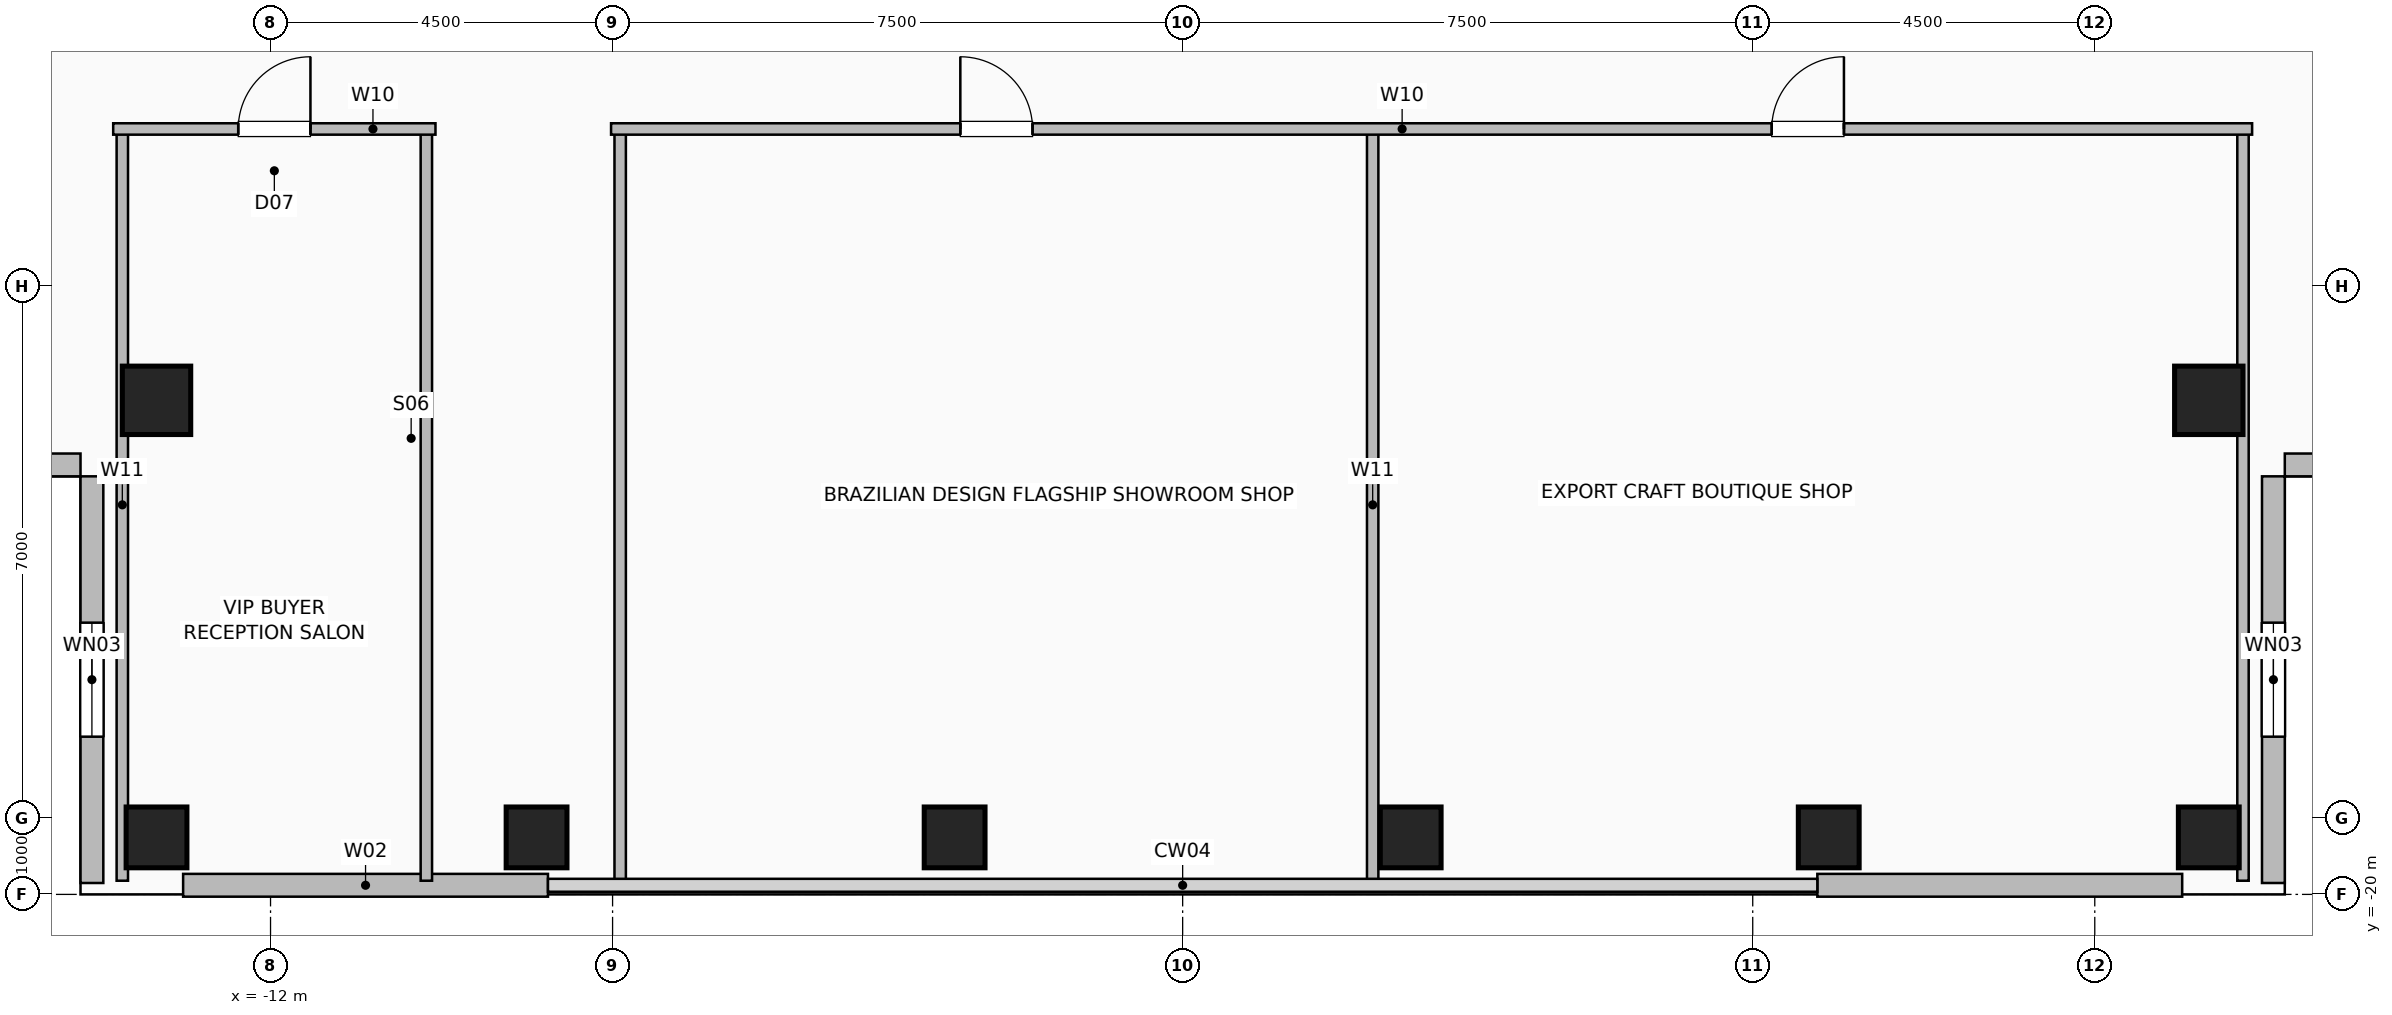
"""IFC4 building model, lengths in metres.
Left out: names, types, materials, properties, quantities, classifications, styles, units other than length and angle.
Written with IfcOpenShell. Run it as: python <this file> out.ifc"""

import sys

from ifc_helpers import new_model, si_unit, direction, frame, frame_2d, origin, origin_2d, place, context, subcontext, project, spatial, rectangle, hollow_rectangle, extrude, element, fill, save


model = new_model("IFC4")
c1 = context("Model", 3, precision=1e-05, world=origin(), true_north=direction((0.0, 1.0)))
c2 = subcontext(c1, "Body", "Model", "MODEL_VIEW")
j1 = project(units=[si_unit("LENGTHUNIT", "METRE"), si_unit("PLANEANGLEUNIT", "RADIAN")], contexts=[c1])
p1 = place(None, origin())
s1 = spatial("IfcSite", under=j1, at=p1, CompositionType="ELEMENT")
p2 = place(p1, origin())
s2 = spatial("IfcBuilding", under=s1, at=p2, CompositionType="ELEMENT")
p3 = place(p2, frame((0.0, 0.0, 223.8)))
s3 = spatial("IfcBuildingStorey", under=s2, at=p3, CompositionType="ELEMENT", Elevation=223.8)
for number, where, z_axis, x_axis in (
    (1, (-13.5, -19.25, 0.0), (0.0, 0.0, 1.0), (1.0, 0.0, 0.0)),
    (2, (-8.5, -19.25, 0.0), (0.0, 0.0, 1.0), (1.0, 0.0, 0.0)),
    (3, (-3.0, -19.25, 0.0), (0.0, 0.0, 1.0), (1.0, 0.0, 0.0)),
    (4, (3.0, -19.25, 0.0), (0.0, 0.0, 1.0), (1.0, 0.0, 0.0)),
    (5, (8.5, -19.25, 0.0), (0.0, 0.0, 1.0), (1.0, 0.0, 0.0)),
    (6, (13.5, -19.25, 0.0), (0.0, 0.0, 1.0), (1.0, 0.0, 0.0)),
):
    element("IfcColumn", number, at=place(p3, frame(where, z_axis=z_axis, x_axis=x_axis)), inside=s3, PredefinedType="COLUMN", context=c2, shape_type="SweptSolid", body=[
        extrude(hollow_rectangle(XDim=0.8, YDim=0.8, WallThickness=0.04, at=origin_2d()), origin(), (0.0, 0.0, 1.0), 3.6),
    ])
for number, where, z_axis, x_axis in (
    (7, (-13.5, -13.5, 0.0), (0.0, 0.0, 1.0), (1.0, 0.0, 0.0)),
    (8, (13.5, -13.5, 0.0), (0.0, 0.0, 1.0), (1.0, 0.0, 0.0)),
):
    element("IfcColumn", number, at=place(p3, frame(where, z_axis=z_axis, x_axis=x_axis)), inside=s3, PredefinedType="COLUMN", context=c2, shape_type="SweptSolid", body=[
        extrude(hollow_rectangle(XDim=0.9, YDim=0.9, WallThickness=0.045, at=origin_2d()), origin(), (0.0, 0.0, 1.0), 3.6),
    ])
for number, where, z_axis, x_axis in (
    (9, (-13.15, -19.88, 0.0), (0.0, 0.0, 1.0), (1.0, 0.0, 0.0)),
    (10, (8.35, -19.88, 0.0), (0.0, 0.0, 1.0), (1.0, 0.0, 0.0)),
):
    element("IfcWall", number, at=place(p3, frame(where, z_axis=z_axis, x_axis=x_axis)), inside=s3, PredefinedType="SOLIDWALL", context=c2, shape_type="SweptSolid", body=[
        extrude(rectangle(XDim=4.8, YDim=0.3, at=frame_2d((2.4, 0.0))), origin(), (0.0, 0.0, 1.0), 3.25),
    ])
p4 = place(p3, frame((-14.35, -19.85, 0.0), z_axis=(0.0, 0.0, 1.0), x_axis=(0.0, 1.0, 0.0)))
e11 = element("IfcWall", 11, at=p4, inside=s3, PredefinedType="SOLIDWALL", context=c2, shape_type="SweptSolid", body=[
    extrude(rectangle(XDim=5.35, YDim=0.3, at=frame_2d((2.675, 0.0))), origin(), (0.0, 0.0, 1.0), 3.25),
])
p5 = place(p4, frame((1.925, 0.0, 0.9)))
e12 = element("IfcOpeningElement", 12, at=p5, cuts=e11, PredefinedType="OPENING", context=c2, shape_type="SweptSolid", body=[
    extrude(rectangle(XDim=1.5, YDim=1.8, at=frame_2d((0.75, 0.9))), frame((0.0, 0.16, 0.0), z_axis=(0.0, -1.0, 0.0), x_axis=(1.0, 0.0, 0.0)), (0.0, 0.0, 1.0), 0.32),
])
p6 = place(p3, frame((-19.85, -14.35, 0.0), z_axis=(0.0, 0.0, 1.0), x_axis=(1.0, 0.0, 0.0)))
e13 = element("IfcWall", 13, at=p6, inside=s3, PredefinedType="SOLIDWALL", context=c2, shape_type="SweptSolid", body=[
    extrude(rectangle(XDim=5.35, YDim=0.3, at=frame_2d((2.675, 0.0))), origin(), (0.0, 0.0, 1.0), 3.25),
])
p7 = place(p3, frame((14.35, -19.85, 0.0), z_axis=(0.0, 0.0, 1.0), x_axis=(0.0, 1.0, 0.0)))
e14 = element("IfcWall", 14, at=p7, inside=s3, PredefinedType="SOLIDWALL", context=c2, shape_type="SweptSolid", body=[
    extrude(rectangle(XDim=5.35, YDim=0.3, at=frame_2d((2.675, 0.0))), origin(), (0.0, 0.0, 1.0), 3.25),
])
p8 = place(p7, frame((1.925, 0.0, 0.9)))
e15 = element("IfcOpeningElement", 15, at=p8, cuts=e14, PredefinedType="OPENING", context=c2, shape_type="SweptSolid", body=[
    extrude(rectangle(XDim=1.5, YDim=1.8, at=frame_2d((0.75, 0.9))), frame((0.0, 0.16, 0.0), z_axis=(0.0, -1.0, 0.0), x_axis=(1.0, 0.0, 0.0)), (0.0, 0.0, 1.0), 0.32),
])
p9 = place(p3, frame((19.85, -14.35, 0.0), z_axis=(0.0, 0.0, 1.0), x_axis=(-1.0, 0.0, 0.0)))
e16 = element("IfcWall", 16, at=p9, inside=s3, PredefinedType="SOLIDWALL", context=c2, shape_type="SweptSolid", body=[
    extrude(rectangle(XDim=5.35, YDim=0.3, at=frame_2d((2.675, 0.0))), origin(), (0.0, 0.0, 1.0), 3.25),
])
for number, where, z_axis, x_axis in (
    (17, (-13.95, -19.82, 0.0), (0.0, 0.0, 1.0), (0.0, 1.0, 0.0)),
    (18, (-9.95, -19.82, 0.0), (0.0, 0.0, 1.0), (0.0, 1.0, 0.0)),
):
    element("IfcWall", number, at=place(p3, frame(where, z_axis=z_axis, x_axis=x_axis)), inside=s3, PredefinedType="PARTITIONING", context=c2, shape_type="SweptSolid", body=[
        extrude(rectangle(XDim=9.89, YDim=0.15, at=frame_2d((4.945, 0.0))), origin(), (0.0, 0.0, 1.0), 3.25),
    ])
p10 = place(p3, frame((-14.07, -9.93, 0.0), z_axis=(0.0, 0.0, 1.0), x_axis=(1.0, 0.0, 0.0)))
e19 = element("IfcWall", 19, at=p10, inside=s3, PredefinedType="PARTITIONING", context=c2, shape_type="SweptSolid", body=[
    extrude(rectangle(XDim=4.24, YDim=0.15, at=frame_2d((2.12, 0.0))), origin(), (0.0, 0.0, 1.0), 3.25),
])
p11 = place(p10, frame((1.645, 0.0, 0.0)))
e20 = element("IfcOpeningElement", 20, at=p11, cuts=e19, PredefinedType="OPENING", context=c2, shape_type="SweptSolid", body=[
    extrude(rectangle(XDim=0.95, YDim=2.06, at=frame_2d((0.475, 1.03))), frame((0.0, 0.085, 0.0), z_axis=(0.0, -1.0, 0.0), x_axis=(1.0, 0.0, 0.0)), (0.0, 0.0, 1.0), 0.17),
])
for number, where, z_axis, x_axis in (
    (21, (-7.4, -19.82, 0.0), (0.0, 0.0, 1.0), (0.0, 1.0, 0.0)),
    (22, (2.5, -19.82, 0.0), (0.0, 0.0, 1.0), (0.0, 1.0, 0.0)),
    (23, (13.95, -19.82, 0.0), (0.0, 0.0, 1.0), (0.0, 1.0, 0.0)),
):
    element("IfcWall", number, at=place(p3, frame(where, z_axis=z_axis, x_axis=x_axis)), inside=s3, PredefinedType="PARTITIONING", context=c2, shape_type="SweptSolid", body=[
        extrude(rectangle(XDim=9.89, YDim=0.15, at=frame_2d((4.945, 0.0))), origin(), (0.0, 0.0, 1.0), 3.25),
    ])
p12 = place(p3, frame((-7.52, -9.93, 0.0), z_axis=(0.0, 0.0, 1.0), x_axis=(1.0, 0.0, 0.0)))
e24 = element("IfcWall", 24, at=p12, inside=s3, PredefinedType="PARTITIONING", context=c2, shape_type="SweptSolid", body=[
    extrude(rectangle(XDim=21.59, YDim=0.15, at=frame_2d((10.795, 0.0))), origin(), (0.0, 0.0, 1.0), 3.25),
])
p13 = place(p12, frame((4.595, 0.0, 0.0)))
e25 = element("IfcOpeningElement", 25, at=p13, cuts=e24, PredefinedType="OPENING", context=c2, shape_type="SweptSolid", body=[
    extrude(rectangle(XDim=0.95, YDim=2.06, at=frame_2d((0.475, 1.03))), frame((0.0, 0.085, 0.0), z_axis=(0.0, -1.0, 0.0), x_axis=(1.0, 0.0, 0.0)), (0.0, 0.0, 1.0), 0.17),
])
p14 = place(p12, frame((15.27, 0.0, 0.0)))
e26 = element("IfcOpeningElement", 26, at=p14, cuts=e24, PredefinedType="OPENING", context=c2, shape_type="SweptSolid", body=[
    extrude(rectangle(XDim=0.95, YDim=2.06, at=frame_2d((0.475, 1.03))), frame((0.0, 0.085, 0.0), z_axis=(0.0, -1.0, 0.0), x_axis=(1.0, 0.0, 0.0)), (0.0, 0.0, 1.0), 0.17),
])
p15 = place(p5, origin())
e27 = element("IfcWindow", 27, at=p15, inside=s3, PartitioningType="SINGLE_PANEL", PredefinedType="WINDOW", context=c2, shape_type="SweptSolid", body=[
    extrude(rectangle(XDim=1.5, YDim=1.8, at=frame_2d((0.75, 0.9))), frame((0.0, 0.03, 0.0), z_axis=(0.0, -1.0, 0.0), x_axis=(1.0, 0.0, 0.0)), (0.0, 0.0, 1.0), 0.06),
])
fill(e12, e27)
p16 = place(p8, origin())
e28 = element("IfcWindow", 28, at=p16, inside=s3, PartitioningType="SINGLE_PANEL", PredefinedType="WINDOW", context=c2, shape_type="SweptSolid", body=[
    extrude(rectangle(XDim=1.5, YDim=1.8, at=frame_2d((0.75, 0.9))), frame((0.0, 0.03, 0.0), z_axis=(0.0, -1.0, 0.0), x_axis=(1.0, 0.0, 0.0)), (0.0, 0.0, 1.0), 0.06),
])
fill(e15, e28)
p17 = place(p11, origin())
e29 = element("IfcDoor", 29, at=p17, inside=s3, OperationType="SINGLE_SWING_RIGHT", PredefinedType="DOOR", context=c2, shape_type="SweptSolid", body=[
    extrude(rectangle(XDim=0.95, YDim=2.06, at=frame_2d((0.475, 1.03))), frame((0.0, 0.025, 0.0), z_axis=(0.0, -1.0, 0.0), x_axis=(1.0, 0.0, 0.0)), (0.0, 0.0, 1.0), 0.05),
])
fill(e20, e29)
p18 = place(p13, origin())
e30 = element("IfcDoor", 30, at=p18, inside=s3, OperationType="SINGLE_SWING_LEFT", PredefinedType="DOOR", context=c2, shape_type="SweptSolid", body=[
    extrude(rectangle(XDim=0.95, YDim=2.06, at=frame_2d((0.475, 1.03))), frame((0.0, 0.025, 0.0), z_axis=(0.0, -1.0, 0.0), x_axis=(1.0, 0.0, 0.0)), (0.0, 0.0, 1.0), 0.05),
])
fill(e25, e30)
p19 = place(p14, origin())
e31 = element("IfcDoor", 31, at=p19, inside=s3, OperationType="SINGLE_SWING_RIGHT", PredefinedType="DOOR", context=c2, shape_type="SweptSolid", body=[
    extrude(rectangle(XDim=0.95, YDim=2.06, at=frame_2d((0.475, 1.03))), frame((0.0, 0.025, 0.0), z_axis=(0.0, -1.0, 0.0), x_axis=(1.0, 0.0, 0.0)), (0.0, 0.0, 1.0), 0.05),
])
fill(e26, e31)
save(model, sys.argv[1])
